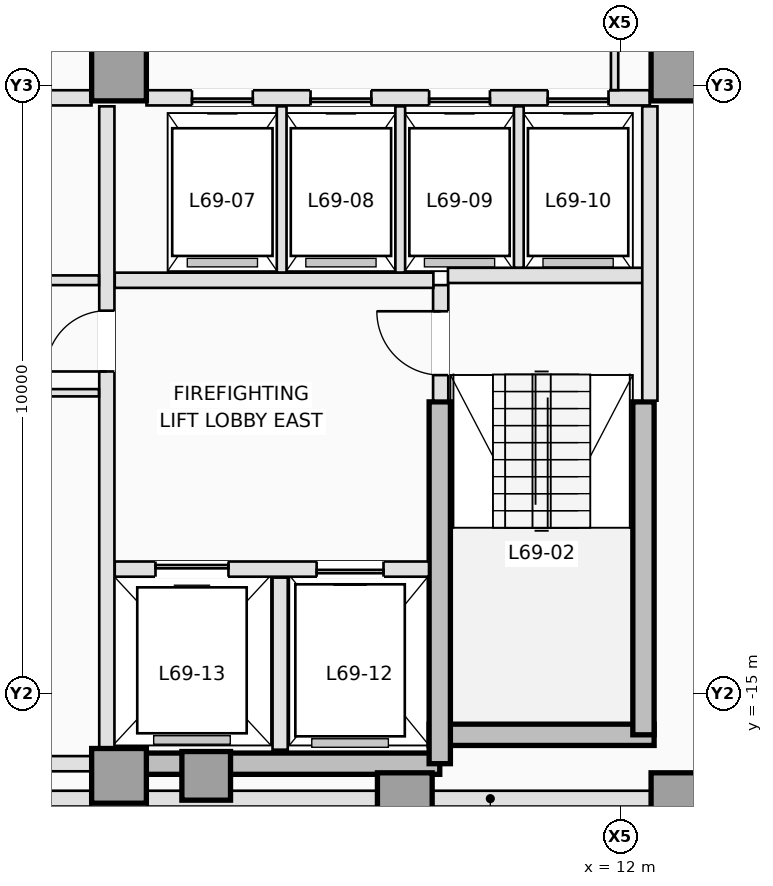
"""IFC4 building model, lengths in metres.
Left out: names, types, materials, properties, quantities, classifications, styles, units other than length and angle.
Written with IfcOpenShell. Run it as: python <this file> out.ifc"""

import sys

from ifc_helpers import new_model, si_unit, direction, frame, frame_2d, origin, origin_2d, place, context, subcontext, project, spatial, rectangle, extrude, element, fill, save


model = new_model("IFC4")
c1 = context("Model", 3, precision=1e-05, world=origin(), true_north=direction((0.0, 1.0)))
c2 = subcontext(c1, "Body", "Model", "MODEL_VIEW")
j1 = project(units=[si_unit("LENGTHUNIT", "METRE"), si_unit("PLANEANGLEUNIT", "RADIAN")], contexts=[c1])
p1 = place(None, origin())
s1 = spatial("IfcSite", under=j1, at=p1, CompositionType="ELEMENT")
p2 = place(p1, origin())
s2 = spatial("IfcBuilding", under=s1, at=p2, CompositionType="ELEMENT")
p3 = place(p2, frame((0.0, 0.0, 249.9)))
s3 = spatial("IfcBuildingStorey", under=s2, at=p3, CompositionType="ELEMENT", Elevation=249.9)
p4 = place(p3, frame((3.75, -16.15, 0.0), z_axis=(0.0, 0.0, 1.0), x_axis=(1.0, 0.0, 0.0)))
e1 = element("IfcWall", 1, at=p4, inside=s3, PredefinedType="SHEAR", context=c2, shape_type="SweptSolid", body=[
    extrude(rectangle(XDim=5.275, YDim=0.35, at=frame_2d((2.637, 0.0))), origin(), (0.0, 0.0, 1.0), 3.5),
])
p5 = place(p3, frame((8.85, -15.675, 0.0), z_axis=(0.0, 0.0, 1.0), x_axis=(1.0, 0.0, 0.0)))
e2 = element("IfcWall", 2, at=p5, inside=s3, PredefinedType="SHEAR", context=c2, shape_type="SweptSolid", body=[
    extrude(rectangle(XDim=3.7, YDim=0.35, at=frame_2d((1.85, 0.0))), origin(), (0.0, 0.0, 1.0), 3.5),
])
p6 = place(p3, frame((12.375, -15.675, 0.0), z_axis=(0.0, 0.0, 1.0), x_axis=(0.0, 1.0, 0.0)))
e3 = element("IfcWall", 3, at=p6, inside=s3, PredefinedType="SHEAR", context=c2, shape_type="SweptSolid", body=[
    extrude(rectangle(XDim=5.475, YDim=0.35, at=frame_2d((2.738, 0.0))), origin(), (0.0, 0.0, 1.0), 3.5),
])
p7 = place(p3, frame((9.025, -16.15, 0.0), z_axis=(0.0, 0.0, 1.0), x_axis=(0.0, 1.0, 0.0)))
e4 = element("IfcWall", 4, at=p7, inside=s3, PredefinedType="SHEAR", context=c2, shape_type="SweptSolid", body=[
    extrude(rectangle(XDim=5.95, YDim=0.35, at=frame_2d((2.975, 0.0))), origin(), (0.0, 0.0, 1.0), 3.5),
])
for number, where, z_axis, x_axis in (
    (5, (3.75, -16.35, 0.0), (0.0, 0.0, 1.0), (1.0, 0.0, 0.0)),
    (6, (8.45, -16.75, 0.0), (0.0, 0.0, 1.0), (1.0, 0.0, 0.0)),
    (7, (12.95, -16.75, 0.0), (0.0, 0.0, 1.0), (1.0, 0.0, 0.0)),
    (8, (3.75, -4.8, 0.0), (0.0, 0.0, 1.0), (1.0, 0.0, 0.0)),
    (9, (12.95, -4.8, 0.0), (0.0, 0.0, 1.0), (1.0, 0.0, 0.0)),
):
    element("IfcColumn", number, at=place(p3, frame(where, z_axis=z_axis, x_axis=x_axis)), inside=s3, PredefinedType="COLUMN", context=c2, shape_type="SweptSolid", body=[
        extrude(rectangle(XDim=0.9, YDim=0.9, at=origin_2d()), origin(), (0.0, 0.0, 1.0), 3.5),
    ])
p8 = place(p3, frame((5.184, -16.35, 0.0), z_axis=(0.0, 0.0, 1.0), x_axis=(0.0, 1.0, 0.0)))
e10 = element("IfcColumn", 10, at=p8, inside=s3, PredefinedType="COLUMN", context=c2, shape_type="SweptSolid", body=[
    extrude(rectangle(XDim=0.8, YDim=0.8, at=origin_2d()), origin(), (0.0, 0.0, 1.0), 3.5),
])
p9 = place(p3, frame((15.493, -16.725, 0.0), z_axis=(0.0, 0.0, 1.0), x_axis=(-1.0, 0.0, 0.0)))
e11 = element("IfcWall", 11, at=p9, inside=s3, PredefinedType="STANDARD", context=c2, shape_type="SweptSolid", body=[
    extrude(rectangle(XDim=11.273, YDim=0.26, at=frame_2d((5.636, 0.0))), origin(), (0.0, 0.0, 1.0), 2.79),
])
p10 = place(p3, frame((3.28, -16.725, 0.0), z_axis=(0.0, 0.0, 1.0), x_axis=(-1.0, 0.0, 0.0)))
e12 = element("IfcWall", 12, at=p10, inside=s3, PredefinedType="STANDARD", context=c2, shape_type="SweptSolid", body=[
    extrude(rectangle(XDim=2.674, YDim=0.26, at=frame_2d((1.337, 0.0))), origin(), (0.0, 0.0, 1.0), 3.25),
])
p11 = place(p3, frame((9.04, -10.18, 0.0), z_axis=(0.0, 0.0, 1.0), x_axis=(0.0, 1.0, 0.0)))
e13 = element("IfcWall", 13, at=p11, inside=s3, PredefinedType="PARTITIONING", context=c2, shape_type="SweptSolid", body=[
    extrude(rectangle(XDim=1.9, YDim=0.25, at=frame_2d((0.95, 0.0))), origin(), (0.0, 0.0, 1.0), 3.25),
])
p12 = place(p11, frame((0.42, 0.0, 0.0)))
e14 = element("IfcOpeningElement", 14, at=p12, cuts=e13, PredefinedType="OPENING", context=c2, shape_type="SweptSolid", body=[
    extrude(rectangle(XDim=1.05, YDim=2.15, at=frame_2d((0.525, 1.075))), frame((0.0, 0.135, 0.0), z_axis=(0.0, -1.0, 0.0), x_axis=(1.0, 0.0, 0.0)), (0.0, 0.0, 1.0), 0.27),
])
p13 = place(p3, frame((9.16, -8.12, 0.0), z_axis=(0.0, 0.0, 1.0), x_axis=(1.0, 0.0, 0.0)))
e15 = element("IfcWall", 15, at=p13, inside=s3, PredefinedType="PARTITIONING", context=c2, shape_type="SweptSolid", body=[
    extrude(rectangle(XDim=3.22, YDim=0.25, at=frame_2d((1.61, 0.0))), origin(), (0.0, 0.0, 1.0), 3.25),
])
p14 = place(p3, frame((12.48, -10.18, 0.0), z_axis=(0.0, 0.0, 1.0), x_axis=(0.0, 1.0, 0.0)))
e16 = element("IfcWall", 16, at=p14, inside=s3, PredefinedType="PARTITIONING", context=c2, shape_type="SweptSolid", body=[
    extrude(rectangle(XDim=4.84, YDim=0.25, at=frame_2d((2.42, 0.0))), origin(), (0.0, 0.0, 1.0), 3.25),
])
p15 = place(p3, frame((3.68, -12.95, 0.0), z_axis=(0.0, 0.0, 1.0), x_axis=(1.0, 0.0, 0.0)))
e17 = element("IfcWall", 17, at=p15, inside=s3, PredefinedType="PARTITIONING", context=c2, shape_type="SweptSolid", body=[
    extrude(rectangle(XDim=5.168, YDim=0.25, at=frame_2d((2.584, 0.0))), origin(), (0.0, 0.0, 1.0), 3.25),
])
p16 = place(p15, frame((3.32, 0.0, 0.0)))
e18 = element("IfcOpeningElement", 18, at=p16, cuts=e17, PredefinedType="OPENING", context=c2, shape_type="SweptSolid", body=[
    extrude(rectangle(XDim=1.1, YDim=2.15, at=frame_2d((0.55, 1.075))), frame((0.0, 0.135, 0.0), z_axis=(0.0, -1.0, 0.0), x_axis=(1.0, 0.0, 0.0)), (0.0, 0.0, 1.0), 0.27),
])
p17 = place(p15, frame((0.67, 0.0, 0.0)))
e19 = element("IfcOpeningElement", 19, at=p17, cuts=e17, PredefinedType="OPENING", context=c2, shape_type="SweptSolid", body=[
    extrude(rectangle(XDim=1.2, YDim=2.15, at=frame_2d((0.6, 1.075))), frame((0.0, 0.135, 0.0), z_axis=(0.0, -1.0, 0.0), x_axis=(1.0, 0.0, 0.0)), (0.0, 0.0, 1.0), 0.27),
])
p18 = place(p3, frame((6.4, -15.92, 0.0), z_axis=(0.0, 0.0, 1.0), x_axis=(0.0, 1.0, 0.0)))
e20 = element("IfcWall", 20, at=p18, inside=s3, PredefinedType="PARTITIONING", context=c2, shape_type="SweptSolid", body=[
    extrude(rectangle(XDim=2.83, YDim=0.25, at=frame_2d((1.415, 0.0))), origin(), (0.0, 0.0, 1.0), 3.25),
])
p19 = place(p3, frame((3.68, -8.2, 0.0), z_axis=(0.0, 0.0, 1.0), x_axis=(1.0, 0.0, 0.0)))
e21 = element("IfcWall", 21, at=p19, inside=s3, PredefinedType="PARTITIONING", context=c2, shape_type="SweptSolid", body=[
    extrude(rectangle(XDim=5.24, YDim=0.25, at=frame_2d((2.62, 0.0))), origin(), (0.0, 0.0, 1.0), 3.25),
])
p20 = place(p3, frame((3.55, -15.898, 0.0), z_axis=(0.0, 0.0, 1.0), x_axis=(0.0, 1.0, 0.0)))
e22 = element("IfcWall", 22, at=p20, inside=s3, PredefinedType="PARTITIONING", context=c2, shape_type="SweptSolid", body=[
    extrude(rectangle(XDim=10.558, YDim=0.25, at=frame_2d((5.279, 0.0))), origin(), (0.0, 0.0, 1.0), 3.25),
])
p21 = place(p20, frame((6.198, 0.0, 0.0)))
e23 = element("IfcOpeningElement", 23, at=p21, cuts=e22, PredefinedType="OPENING", context=c2, shape_type="SweptSolid", body=[
    extrude(rectangle(XDim=1.0, YDim=2.15, at=frame_2d((0.5, 1.075))), frame((0.0, 0.135, 0.0), z_axis=(0.0, -1.0, 0.0), x_axis=(1.0, 0.0, 0.0)), (0.0, 0.0, 1.0), 0.27),
])
p22 = place(p3, frame((4.202, -5.2, 0.0), z_axis=(0.0, 0.0, 1.0), x_axis=(1.0, 0.0, 0.0)))
e24 = element("IfcWall", 24, at=p22, inside=s3, PredefinedType="PARTITIONING", context=c2, shape_type="SweptSolid", body=[
    extrude(rectangle(XDim=8.278, YDim=0.25, at=frame_2d((4.139, 0.0))), origin(), (0.0, 0.0, 1.0), 3.25),
])
p23 = place(p22, frame((0.748, 0.0, 0.0)))
e25 = element("IfcOpeningElement", 25, at=p23, cuts=e24, PredefinedType="OPENING", context=c2, shape_type="SweptSolid", body=[
    extrude(rectangle(XDim=1.0, YDim=2.15, at=frame_2d((0.5, 1.075))), frame((0.0, 0.135, 0.0), z_axis=(0.0, -1.0, 0.0), x_axis=(1.0, 0.0, 0.0)), (0.0, 0.0, 1.0), 0.27),
])
p24 = place(p22, frame((2.698, 0.0, 0.0)))
e26 = element("IfcOpeningElement", 26, at=p24, cuts=e24, PredefinedType="OPENING", context=c2, shape_type="SweptSolid", body=[
    extrude(rectangle(XDim=1.0, YDim=2.15, at=frame_2d((0.5, 1.075))), frame((0.0, 0.135, 0.0), z_axis=(0.0, -1.0, 0.0), x_axis=(1.0, 0.0, 0.0)), (0.0, 0.0, 1.0), 0.27),
])
p25 = place(p22, frame((4.648, 0.0, 0.0)))
e27 = element("IfcOpeningElement", 27, at=p25, cuts=e24, PredefinedType="OPENING", context=c2, shape_type="SweptSolid", body=[
    extrude(rectangle(XDim=1.0, YDim=2.15, at=frame_2d((0.5, 1.075))), frame((0.0, 0.135, 0.0), z_axis=(0.0, -1.0, 0.0), x_axis=(1.0, 0.0, 0.0)), (0.0, 0.0, 1.0), 0.27),
])
p26 = place(p22, frame((6.598, 0.0, 0.0)))
e28 = element("IfcOpeningElement", 28, at=p26, cuts=e24, PredefinedType="OPENING", context=c2, shape_type="SweptSolid", body=[
    extrude(rectangle(XDim=1.0, YDim=2.15, at=frame_2d((0.5, 1.075))), frame((0.0, 0.135, 0.0), z_axis=(0.0, -1.0, 0.0), x_axis=(1.0, 0.0, 0.0)), (0.0, 0.0, 1.0), 0.27),
])
p27 = place(p3, frame((0.95, -5.2, 0.0), z_axis=(0.0, 0.0, 1.0), x_axis=(1.0, 0.0, 0.0)))
e29 = element("IfcWall", 29, at=p27, inside=s3, PredefinedType="PARTITIONING", context=c2, shape_type="SweptSolid", body=[
    extrude(rectangle(XDim=2.348, YDim=0.25, at=frame_2d((1.174, 0.0))), origin(), (0.0, 0.0, 1.0), 3.25),
])
for number, where, z_axis, x_axis in (
    (30, (6.425, -8.073, 0.0), (0.0, 0.0, 1.0), (0.0, 1.0, 0.0)),
    (31, (8.375, -8.073, 0.0), (0.0, 0.0, 1.0), (0.0, 1.0, 0.0)),
):
    element("IfcWall", number, at=place(p3, frame(where, z_axis=z_axis, x_axis=x_axis)), inside=s3, PredefinedType="PARTITIONING", context=c2, shape_type="SweptSolid", body=[
        extrude(rectangle(XDim=2.733, YDim=0.16, at=frame_2d((1.366, 0.0))), origin(), (0.0, 0.0, 1.0), 3.25),
    ])
p28 = place(p3, frame((10.325, -7.993, 0.0), z_axis=(0.0, 0.0, 1.0), x_axis=(0.0, 1.0, 0.0)))
e32 = element("IfcWall", 32, at=p28, inside=s3, PredefinedType="PARTITIONING", context=c2, shape_type="SweptSolid", body=[
    extrude(rectangle(XDim=2.653, YDim=0.16, at=frame_2d((1.326, 0.0))), origin(), (0.0, 0.0, 1.0), 3.25),
])
p29 = place(p3, frame((-3.298, -16.15, 0.0), z_axis=(0.0, 0.0, 1.0), x_axis=(1.0, 0.0, 0.0)))
e33 = element("IfcWall", 33, at=p29, inside=s3, PredefinedType="PARTITIONING", context=c2, shape_type="SweptSolid", body=[
    extrude(rectangle(XDim=6.596, YDim=0.25, at=frame_2d((3.298, 0.0))), origin(), (0.0, 0.0, 1.0), 2.844),
])
p30 = place(p3, frame((-3.42, -8.2, 0.0), z_axis=(0.0, 0.0, 1.0), x_axis=(1.0, 0.0, 0.0)))
e34 = element("IfcWall", 34, at=p30, inside=s3, PredefinedType="PARTITIONING", context=c2, shape_type="SweptSolid", body=[
    extrude(rectangle(XDim=6.84, YDim=0.16, at=frame_2d((3.42, 0.0))), origin(), (0.0, 0.0, 1.0), 3.25),
])
p31 = place(p30, frame((2.92, 0.0, 0.0)))
e35 = element("IfcOpeningElement", 35, at=p31, cuts=e34, PredefinedType="OPENING", context=c2, shape_type="SweptSolid", body=[
    extrude(rectangle(XDim=1.0, YDim=2.15, at=frame_2d((0.5, 1.075))), frame((0.0, 0.09, 0.0), z_axis=(0.0, -1.0, 0.0), x_axis=(1.0, 0.0, 0.0)), (0.0, 0.0, 1.0), 0.18),
])
p32 = place(p3, frame((-3.42, -10.05, 0.0), z_axis=(0.0, 0.0, 1.0), x_axis=(1.0, 0.0, 0.0)))
e36 = element("IfcWall", 36, at=p32, inside=s3, PredefinedType="PARTITIONING", context=c2, shape_type="SweptSolid", body=[
    extrude(rectangle(XDim=6.84, YDim=0.12, at=frame_2d((3.42, 0.0))), origin(), (0.0, 0.0, 1.0), 3.25),
])
p33 = place(p32, frame((0.45, 0.0, 0.0)))
e37 = element("IfcOpeningElement", 37, at=p33, cuts=e36, PredefinedType="OPENING", context=c2, shape_type="SweptSolid", body=[
    extrude(rectangle(XDim=0.88, YDim=2.12, at=frame_2d((0.44, 1.06))), frame((0.0, 0.07, 0.0), z_axis=(0.0, -1.0, 0.0), x_axis=(1.0, 0.0, 0.0)), (0.0, 0.0, 1.0), 0.14),
])
p34 = place(p32, frame((3.6, 0.0, 0.0)))
e38 = element("IfcOpeningElement", 38, at=p34, cuts=e36, PredefinedType="OPENING", context=c2, shape_type="SweptSolid", body=[
    extrude(rectangle(XDim=0.92, YDim=2.12, at=frame_2d((0.46, 1.06))), frame((0.0, 0.07, 0.0), z_axis=(0.0, -1.0, 0.0), x_axis=(1.0, 0.0, 0.0)), (0.0, 0.0, 1.0), 0.14),
])
p35 = place(p3, frame((11.9, -2.792, 0.0), z_axis=(0.0, 0.0, 1.0), x_axis=(0.0, -1.0, 0.0)))
e39 = element("IfcWall", 39, at=p35, inside=s3, PredefinedType="PARTITIONING", context=c2, shape_type="SweptSolid", body=[
    extrude(rectangle(XDim=2.281, YDim=0.12, at=frame_2d((1.141, 0.0))), origin(), (0.0, 0.0, 1.0), 3.25),
])
p36 = place(p23, origin())
e40 = element("IfcDoor", 40, at=p36, inside=s3, OperationType="SLIDING_TO_RIGHT", PredefinedType="DOOR", context=c2, shape_type="SweptSolid", body=[
    extrude(rectangle(XDim=1.0, YDim=2.15, at=frame_2d((0.5, 1.075))), frame((0.0, 0.025, 0.0), z_axis=(0.0, -1.0, 0.0), x_axis=(1.0, 0.0, 0.0)), (0.0, 0.0, 1.0), 0.05),
])
fill(e25, e40)
p37 = place(p24, origin())
e41 = element("IfcDoor", 41, at=p37, inside=s3, OperationType="SLIDING_TO_RIGHT", PredefinedType="DOOR", context=c2, shape_type="SweptSolid", body=[
    extrude(rectangle(XDim=1.0, YDim=2.15, at=frame_2d((0.5, 1.075))), frame((0.0, 0.025, 0.0), z_axis=(0.0, -1.0, 0.0), x_axis=(1.0, 0.0, 0.0)), (0.0, 0.0, 1.0), 0.05),
])
fill(e26, e41)
p38 = place(p25, origin())
e42 = element("IfcDoor", 42, at=p38, inside=s3, OperationType="SLIDING_TO_RIGHT", PredefinedType="DOOR", context=c2, shape_type="SweptSolid", body=[
    extrude(rectangle(XDim=1.0, YDim=2.15, at=frame_2d((0.5, 1.075))), frame((0.0, 0.025, 0.0), z_axis=(0.0, -1.0, 0.0), x_axis=(1.0, 0.0, 0.0)), (0.0, 0.0, 1.0), 0.05),
])
fill(e27, e42)
p39 = place(p26, origin())
e43 = element("IfcDoor", 43, at=p39, inside=s3, OperationType="SLIDING_TO_RIGHT", PredefinedType="DOOR", context=c2, shape_type="SweptSolid", body=[
    extrude(rectangle(XDim=1.0, YDim=2.15, at=frame_2d((0.5, 1.075))), frame((0.0, 0.025, 0.0), z_axis=(0.0, -1.0, 0.0), x_axis=(1.0, 0.0, 0.0)), (0.0, 0.0, 1.0), 0.05),
])
fill(e28, e43)
p40 = place(p16, origin())
e44 = element("IfcDoor", 44, at=p40, inside=s3, OperationType="SLIDING_TO_RIGHT", PredefinedType="DOOR", context=c2, shape_type="SweptSolid", body=[
    extrude(rectangle(XDim=1.1, YDim=2.15, at=frame_2d((0.55, 1.075))), frame((0.0, 0.025, 0.0), z_axis=(0.0, -1.0, 0.0), x_axis=(1.0, 0.0, 0.0)), (0.0, 0.0, 1.0), 0.05),
])
fill(e18, e44)
p41 = place(p17, origin())
e45 = element("IfcDoor", 45, at=p41, inside=s3, OperationType="SLIDING_TO_LEFT", PredefinedType="DOOR", context=c2, shape_type="SweptSolid", body=[
    extrude(rectangle(XDim=1.2, YDim=2.15, at=frame_2d((0.6, 1.075))), frame((0.0, 0.025, 0.0), z_axis=(0.0, -1.0, 0.0), x_axis=(1.0, 0.0, 0.0)), (0.0, 0.0, 1.0), 0.05),
])
fill(e19, e45)
p42 = place(p12, origin())
e46 = element("IfcDoor", 46, at=p42, inside=s3, OperationType="SINGLE_SWING_RIGHT", PredefinedType="DOOR", context=c2, shape_type="SweptSolid", body=[
    extrude(rectangle(XDim=1.05, YDim=2.15, at=frame_2d((0.525, 1.075))), frame((0.0, 0.025, 0.0), z_axis=(0.0, -1.0, 0.0), x_axis=(1.0, 0.0, 0.0)), (0.0, 0.0, 1.0), 0.05),
])
fill(e14, e46)
p43 = place(p21, origin())
e47 = element("IfcDoor", 47, at=p43, inside=s3, OperationType="SINGLE_SWING_LEFT", PredefinedType="DOOR", context=c2, shape_type="SweptSolid", body=[
    extrude(rectangle(XDim=1.0, YDim=2.15, at=frame_2d((0.5, 1.075))), frame((0.0, 0.025, 0.0), z_axis=(0.0, -1.0, 0.0), x_axis=(1.0, 0.0, 0.0)), (0.0, 0.0, 1.0), 0.05),
])
fill(e23, e47)
save(model, sys.argv[1])
